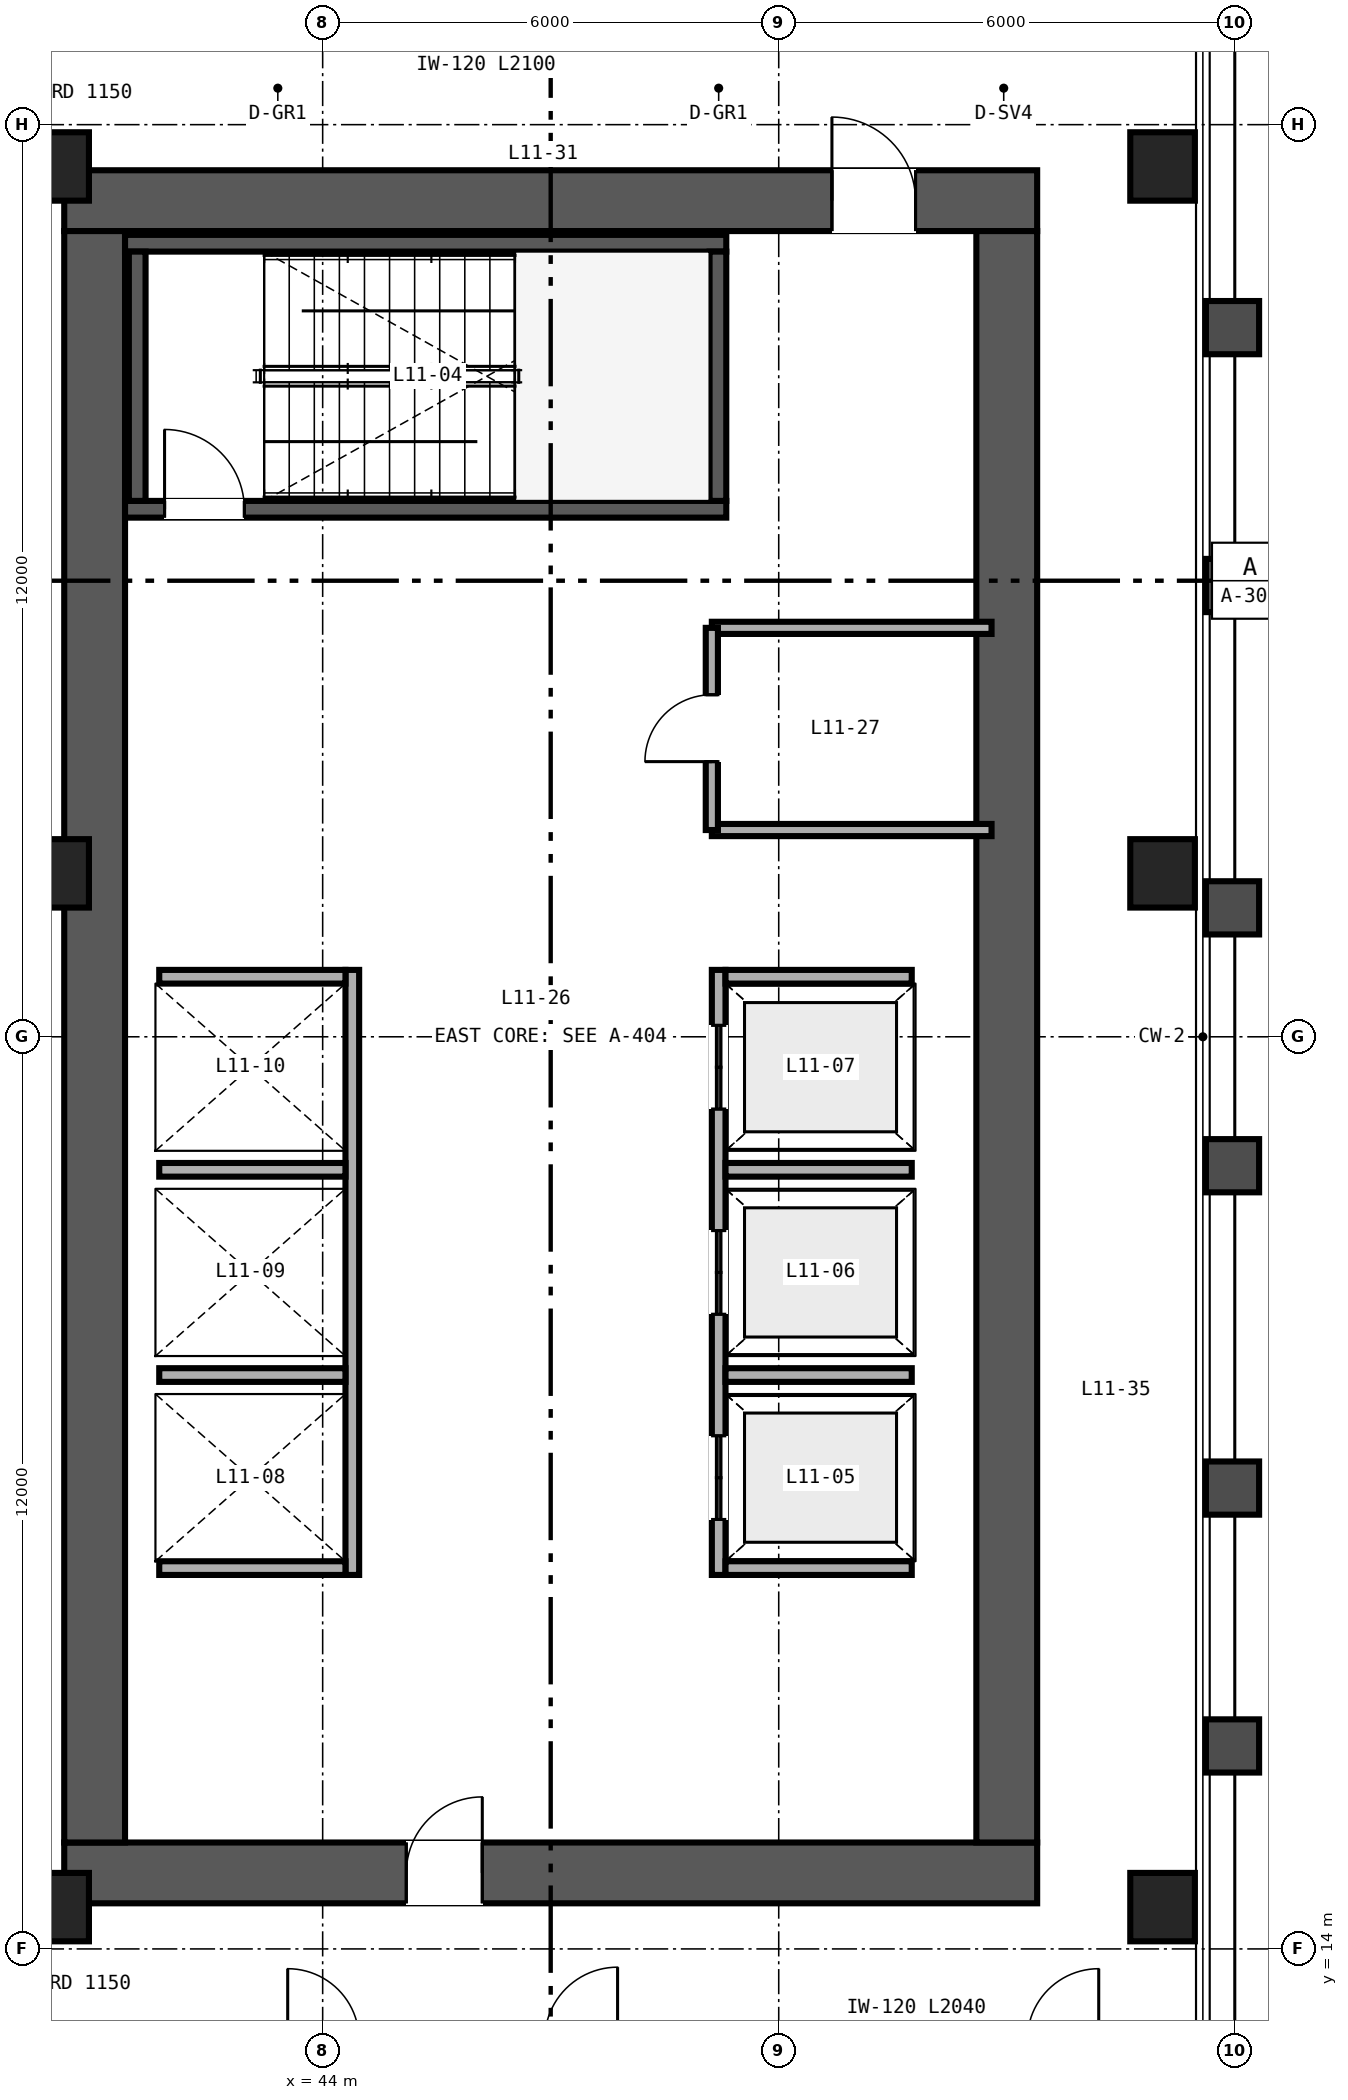
"""IFC4 building model, lengths in metres.
Left out: names, types, materials, properties, quantities, classifications, styles, units other than length and angle.
Written with IfcOpenShell. Run it as: python <this file> out.ifc"""

import sys

from ifc_helpers import new_model, si_unit, direction, frame, frame_2d, origin, origin_2d, place, context, subcontext, project, spatial, rectangle, hollow_rectangle, extrude, source, transform, mapped, element, fill, save


model = new_model("IFC4")
c1 = context("Model", 3, precision=1e-05, world=origin(), true_north=direction((0.0, 1.0)))
c2 = subcontext(c1, "Body", "Model", "MODEL_VIEW")
j1 = project(units=[si_unit("LENGTHUNIT", "METRE"), si_unit("PLANEANGLEUNIT", "RADIAN")], contexts=[c1])
p1 = place(None, origin())
s1 = spatial("IfcSite", under=j1, at=p1, CompositionType="ELEMENT")
p2 = place(p1, origin())
s2 = spatial("IfcBuilding", under=s1, at=p2, CompositionType="ELEMENT")
p3 = place(p2, frame((0.0, 0.0, 49.2)))
s3 = spatial("IfcBuildingStorey", under=s2, at=p3, CompositionType="ELEMENT", Elevation=49.2)
p4 = place(p3, frame((40.6, 15.0, 0.0), z_axis=(0.0, 0.0, 1.0), x_axis=(1.0, 0.0, 0.0)))
e1 = element("IfcWall", 1, at=p4, inside=s3, PredefinedType="SHEAR", context=c2, shape_type="SweptSolid", body=[
    extrude(rectangle(XDim=12.8, YDim=0.8, at=frame_2d((6.4, 0.0))), origin(), (0.0, 0.0, 1.0), 3.35),
])
p5 = place(p4, frame((4.5, 0.0, 0.0)))
e2 = element("IfcOpeningElement", 2, at=p5, cuts=e1, PredefinedType="OPENING", context=c2, shape_type="SweptSolid", body=[
    extrude(rectangle(XDim=1.0, YDim=2.15, at=frame_2d((0.5, 1.075))), frame((0.0, 0.41, 0.0), z_axis=(0.0, -1.0, 0.0), x_axis=(1.0, 0.0, 0.0)), (0.0, 0.0, 1.0), 0.82),
])
p6 = place(p3, frame((40.6, 37.0, 0.0), z_axis=(0.0, 0.0, 1.0), x_axis=(1.0, 0.0, 0.0)))
e3 = element("IfcWall", 3, at=p6, inside=s3, PredefinedType="SHEAR", context=c2, shape_type="SweptSolid", body=[
    extrude(rectangle(XDim=12.8, YDim=0.8, at=frame_2d((6.4, 0.0))), origin(), (0.0, 0.0, 1.0), 3.35),
])
p7 = place(p6, frame((10.1, 0.0, 0.0)))
e4 = element("IfcOpeningElement", 4, at=p7, cuts=e3, PredefinedType="OPENING", context=c2, shape_type="SweptSolid", body=[
    extrude(rectangle(XDim=1.1, YDim=2.15, at=frame_2d((0.55, 1.075))), frame((0.0, 0.41, 0.0), z_axis=(0.0, -1.0, 0.0), x_axis=(1.0, 0.0, 0.0)), (0.0, 0.0, 1.0), 0.82),
])
for number, where, z_axis, x_axis in (
    (5, (41.0, 15.4, 0.0), (0.0, 0.0, 1.0), (0.0, 1.0, 0.0)),
    (6, (53.0, 15.4, 0.0), (0.0, 0.0, 1.0), (0.0, 1.0, 0.0)),
):
    element("IfcWall", number, at=place(p3, frame(where, z_axis=z_axis, x_axis=x_axis)), inside=s3, PredefinedType="SHEAR", context=c2, shape_type="SweptSolid", body=[
        extrude(rectangle(XDim=21.2, YDim=0.8, at=frame_2d((10.6, 0.0))), origin(), (0.0, 0.0, 1.0), 3.35),
    ])
p8 = place(p3, frame((41.4, 32.94, 0.0), z_axis=(0.0, 0.0, 1.0), x_axis=(1.0, 0.0, 0.0)))
e7 = element("IfcWall", 7, at=p8, inside=s3, PredefinedType="SHEAR", context=c2, shape_type="SweptSolid", body=[
    extrude(rectangle(XDim=7.91, YDim=0.22, at=frame_2d((3.955, 0.0))), origin(), (0.0, 0.0, 1.0), 3.4),
])
p9 = place(p8, frame((0.52, 0.0, 0.0)))
e8 = element("IfcOpeningElement", 8, at=p9, cuts=e7, PredefinedType="OPENING", context=c2, shape_type="SweptSolid", body=[
    extrude(rectangle(XDim=1.05, YDim=2.15, at=frame_2d((0.525, 1.075))), frame((0.0, 0.12, 0.0), z_axis=(0.0, -1.0, 0.0), x_axis=(1.0, 0.0, 0.0)), (0.0, 0.0, 1.0), 0.24),
])
p10 = place(p3, frame((41.4, 36.44, 0.0), z_axis=(0.0, 0.0, 1.0), x_axis=(1.0, 0.0, 0.0)))
e9 = element("IfcWall", 9, at=p10, inside=s3, PredefinedType="SHEAR", context=c2, shape_type="SweptSolid", body=[
    extrude(rectangle(XDim=7.91, YDim=0.22, at=frame_2d((3.955, 0.0))), origin(), (0.0, 0.0, 1.0), 3.4),
])
for number, where, z_axis, x_axis in (
    (10, (41.56, 33.05, 0.0), (0.0, 0.0, 1.0), (0.0, 1.0, 0.0)),
    (11, (49.2, 33.05, 0.0), (0.0, 0.0, 1.0), (0.0, 1.0, 0.0)),
):
    element("IfcWall", number, at=place(p3, frame(where, z_axis=z_axis, x_axis=x_axis)), inside=s3, PredefinedType="SHEAR", context=c2, shape_type="SweptSolid", body=[
        extrude(rectangle(XDim=3.28, YDim=0.22, at=frame_2d((1.64, 0.0))), origin(), (0.0, 0.0, 1.0), 3.4),
    ])
m1 = source(origin(), c2, "Body", "SweptSolid", [
    extrude(hollow_rectangle(XDim=0.85, YDim=0.9, WallThickness=0.04, at=origin_2d()), origin(), (0.0, 0.0, 1.0), 3.35),
])
for number, where, z_axis, x_axis in (
    (12, (40.5, 14.55, 0.0), (0.0, 0.0, 1.0), (1.0, 0.0, 0.0)),
    (13, (55.05, 14.55, 0.0), (0.0, 0.0, 1.0), (1.0, 0.0, 0.0)),
    (14, (40.5, 28.15, 0.0), (0.0, 0.0, 1.0), (1.0, 0.0, 0.0)),
    (15, (55.05, 28.15, 0.0), (0.0, 0.0, 1.0), (1.0, 0.0, 0.0)),
    (16, (40.5, 37.45, 0.0), (0.0, 0.0, 1.0), (1.0, 0.0, 0.0)),
    (17, (55.05, 37.45, 0.0), (0.0, 0.0, 1.0), (1.0, 0.0, 0.0)),
):
    element("IfcColumn", number, at=place(p3, frame(where, z_axis=z_axis, x_axis=x_axis)), inside=s3, PredefinedType="COLUMN", context=c2, shape_type="MappedRepresentation", body=[
        mapped(m1, transform((0.0, 0.0, 0.0), scale=1.0)),
    ])
p11 = place(p3, frame((49.21, 18.92, 0.0), z_axis=(0.0, 0.0, 1.0), x_axis=(0.0, 1.0, 0.0)))
e18 = element("IfcWall", 18, at=p11, inside=s3, PredefinedType="SOLIDWALL", context=c2, shape_type="SweptSolid", body=[
    extrude(rectangle(XDim=7.96, YDim=0.18, at=frame_2d((3.98, 0.0))), origin(), (0.0, 0.0, 1.0), 3.35),
])
p12 = place(p11, frame((0.73, 0.0, 0.0)))
e19 = element("IfcOpeningElement", 19, at=p12, cuts=e18, PredefinedType="OPENING", context=c2, shape_type="SweptSolid", body=[
    extrude(rectangle(XDim=1.1, YDim=2.2, at=frame_2d((0.55, 1.1))), frame((0.0, 0.1, 0.0), z_axis=(0.0, -1.0, 0.0), x_axis=(1.0, 0.0, 0.0)), (0.0, 0.0, 1.0), 0.2),
])
p13 = place(p11, frame((3.43, 0.0, 0.0)))
e20 = element("IfcOpeningElement", 20, at=p13, cuts=e18, PredefinedType="OPENING", context=c2, shape_type="SweptSolid", body=[
    extrude(rectangle(XDim=1.1, YDim=2.2, at=frame_2d((0.55, 1.1))), frame((0.0, 0.1, 0.0), z_axis=(0.0, -1.0, 0.0), x_axis=(1.0, 0.0, 0.0)), (0.0, 0.0, 1.0), 0.2),
])
p14 = place(p11, frame((6.13, 0.0, 0.0)))
e21 = element("IfcOpeningElement", 21, at=p14, cuts=e18, PredefinedType="OPENING", context=c2, shape_type="SweptSolid", body=[
    extrude(rectangle(XDim=1.1, YDim=2.2, at=frame_2d((0.55, 1.1))), frame((0.0, 0.1, 0.0), z_axis=(0.0, -1.0, 0.0), x_axis=(1.0, 0.0, 0.0)), (0.0, 0.0, 1.0), 0.2),
])
for number, where, z_axis, x_axis in (
    (22, (49.3, 19.01, 0.0), (0.0, 0.0, 1.0), (1.0, 0.0, 0.0)),
    (23, (49.3, 26.79, 0.0), (0.0, 0.0, 1.0), (1.0, 0.0, 0.0)),
    (24, (49.3, 21.55, 0.0), (0.0, 0.0, 1.0), (1.0, 0.0, 0.0)),
    (25, (49.3, 24.25, 0.0), (0.0, 0.0, 1.0), (1.0, 0.0, 0.0)),
):
    element("IfcWall", number, at=place(p3, frame(where, z_axis=z_axis, x_axis=x_axis)), inside=s3, PredefinedType="SOLIDWALL", context=c2, shape_type="SweptSolid", body=[
        extrude(rectangle(XDim=2.45, YDim=0.18, at=frame_2d((1.225, 0.0))), origin(), (0.0, 0.0, 1.0), 3.35),
    ])
p15 = place(p3, frame((44.39, 18.92, 0.0), z_axis=(0.0, 0.0, 1.0), x_axis=(0.0, 1.0, 0.0)))
e26 = element("IfcWall", 26, at=p15, inside=s3, PredefinedType="SOLIDWALL", context=c2, shape_type="SweptSolid", body=[
    extrude(rectangle(XDim=7.96, YDim=0.18, at=frame_2d((3.98, 0.0))), origin(), (0.0, 0.0, 1.0), 3.35),
])
for number, where, z_axis, x_axis in (
    (27, (41.85, 19.01, 0.0), (0.0, 0.0, 1.0), (1.0, 0.0, 0.0)),
    (28, (41.85, 26.79, 0.0), (0.0, 0.0, 1.0), (1.0, 0.0, 0.0)),
    (29, (41.85, 21.55, 0.0), (0.0, 0.0, 1.0), (1.0, 0.0, 0.0)),
    (30, (41.85, 24.25, 0.0), (0.0, 0.0, 1.0), (1.0, 0.0, 0.0)),
):
    element("IfcWall", number, at=place(p3, frame(where, z_axis=z_axis, x_axis=x_axis)), inside=s3, PredefinedType="SOLIDWALL", context=c2, shape_type="SweptSolid", body=[
        extrude(rectangle(XDim=2.45, YDim=0.18, at=frame_2d((1.225, 0.0))), origin(), (0.0, 0.0, 1.0), 3.35),
    ])
p16 = place(p3, frame((49.12, 28.72, 0.0), z_axis=(0.0, 0.0, 1.0), x_axis=(1.0, 0.0, 0.0)))
e31 = element("IfcWall", 31, at=p16, inside=s3, PredefinedType="PARTITIONING", context=c2, shape_type="SweptSolid", body=[
    extrude(rectangle(XDim=3.68, YDim=0.16, at=frame_2d((1.84, 0.0))), origin(), (0.0, 0.0, 1.0), 3.35),
])
p17 = place(p3, frame((49.12, 31.38, 0.0), z_axis=(0.0, 0.0, 1.0), x_axis=(1.0, 0.0, 0.0)))
e32 = element("IfcWall", 32, at=p17, inside=s3, PredefinedType="PARTITIONING", context=c2, shape_type="SweptSolid", body=[
    extrude(rectangle(XDim=3.68, YDim=0.16, at=frame_2d((1.84, 0.0))), origin(), (0.0, 0.0, 1.0), 2.36),
])
p18 = place(p3, frame((49.12, 28.72, 0.0), z_axis=(0.0, 0.0, 1.0), x_axis=(0.0, 1.0, 0.0)))
e33 = element("IfcWall", 33, at=p18, inside=s3, PredefinedType="PARTITIONING", context=c2, shape_type="SweptSolid", body=[
    extrude(rectangle(XDim=2.66, YDim=0.16, at=frame_2d((1.33, 0.0))), origin(), (0.0, 0.0, 1.0), 2.36),
])
p19 = place(p18, frame((0.9, 0.0, 0.0)))
e34 = element("IfcOpeningElement", 34, at=p19, cuts=e33, PredefinedType="OPENING", context=c2, shape_type="SweptSolid", body=[
    extrude(rectangle(XDim=0.88, YDim=2.15, at=frame_2d((0.44, 1.075))), frame((0.0, 0.09, 0.0), z_axis=(0.0, -1.0, 0.0), x_axis=(1.0, 0.0, 0.0)), (0.0, 0.0, 1.0), 0.18),
])
m2 = source(origin(), c2, "Body", "SweptSolid", [
    extrude(rectangle(XDim=1.05, YDim=2.15, at=frame_2d((0.525, 1.075))), frame((0.0, 0.025, 0.0), z_axis=(0.0, -1.0, 0.0), x_axis=(1.0, 0.0, 0.0)), (0.0, 0.0, 1.0), 0.05),
])
p20 = place(p9, origin())
e35 = element("IfcDoor", 35, at=p20, inside=s3, OperationType="SINGLE_SWING_LEFT", PredefinedType="DOOR", context=c2, shape_type="MappedRepresentation", body=[
    mapped(m2, transform((0.0, 0.0, 0.0), scale=1.0)),
])
fill(e8, e35)
m3 = source(origin(), c2, "Body", "SweptSolid", [
    extrude(rectangle(XDim=1.1, YDim=2.2, at=frame_2d((0.55, 1.1))), frame((0.0, 0.025, 0.0), z_axis=(0.0, -1.0, 0.0), x_axis=(1.0, 0.0, 0.0)), (0.0, 0.0, 1.0), 0.05),
])
p21 = place(p12, origin())
e36 = element("IfcDoor", 36, at=p21, inside=s3, OperationType="DOUBLE_DOOR_SLIDING", PredefinedType="DOOR", context=c2, shape_type="MappedRepresentation", body=[
    mapped(m3, transform((0.0, 0.0, 0.0), scale=1.0)),
])
fill(e19, e36)
p22 = place(p13, origin())
e37 = element("IfcDoor", 37, at=p22, inside=s3, OperationType="DOUBLE_DOOR_SLIDING", PredefinedType="DOOR", context=c2, shape_type="MappedRepresentation", body=[
    mapped(m3, transform((0.0, 0.0, 0.0), scale=1.0)),
])
fill(e20, e37)
p23 = place(p14, origin())
e38 = element("IfcDoor", 38, at=p23, inside=s3, OperationType="DOUBLE_DOOR_SLIDING", PredefinedType="DOOR", context=c2, shape_type="MappedRepresentation", body=[
    mapped(m3, transform((0.0, 0.0, 0.0), scale=1.0)),
])
fill(e21, e38)
m4 = source(origin(), c2, "Body", "SweptSolid", [
    extrude(rectangle(XDim=1.0, YDim=2.15, at=frame_2d((0.5, 1.075))), frame((0.0, 0.025, 0.0), z_axis=(0.0, -1.0, 0.0), x_axis=(1.0, 0.0, 0.0)), (0.0, 0.0, 1.0), 0.05),
])
p24 = place(p5, origin())
e39 = element("IfcDoor", 39, at=p24, inside=s3, OperationType="SINGLE_SWING_RIGHT", PredefinedType="DOOR", context=c2, shape_type="MappedRepresentation", body=[
    mapped(m4, transform((0.0, 0.0, 0.0), scale=1.0)),
])
fill(e2, e39)
m5 = source(origin(), c2, "Body", "SweptSolid", [
    extrude(rectangle(XDim=1.1, YDim=2.15, at=frame_2d((0.55, 1.075))), frame((0.0, 0.025, 0.0), z_axis=(0.0, -1.0, 0.0), x_axis=(1.0, 0.0, 0.0)), (0.0, 0.0, 1.0), 0.05),
])
p25 = place(p7, origin())
e40 = element("IfcDoor", 40, at=p25, inside=s3, OperationType="SINGLE_SWING_LEFT", PredefinedType="DOOR", context=c2, shape_type="MappedRepresentation", body=[
    mapped(m5, transform((0.0, 0.0, 0.0), scale=1.0)),
])
fill(e4, e40)
m6 = source(origin(), c2, "Body", "SweptSolid", [
    extrude(rectangle(XDim=0.88, YDim=2.15, at=frame_2d((0.44, 1.075))), frame((0.0, 0.025, 0.0), z_axis=(0.0, -1.0, 0.0), x_axis=(1.0, 0.0, 0.0)), (0.0, 0.0, 1.0), 0.05),
])
p26 = place(p19, origin())
e41 = element("IfcDoor", 41, at=p26, inside=s3, OperationType="SINGLE_SWING_LEFT", PredefinedType="DOOR", context=c2, shape_type="MappedRepresentation", body=[
    mapped(m6, transform((0.0, 0.0, 0.0), scale=1.0)),
])
fill(e34, e41)
save(model, sys.argv[1])
